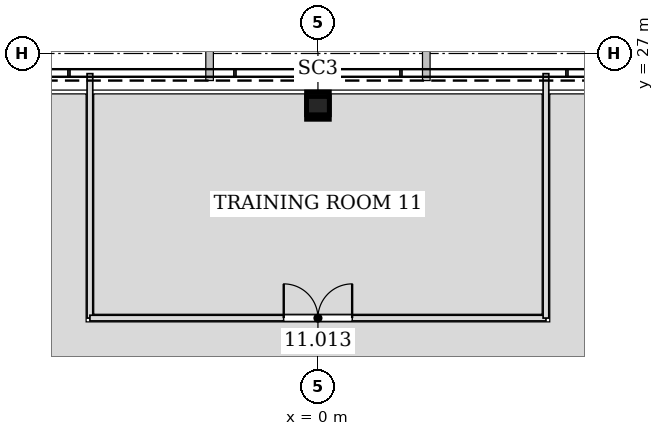
"""IFC4 building model, lengths in metres.
Left out: names, types, materials, properties, quantities, classifications, styles, units other than length and angle.
Written with IfcOpenShell. Run it as: python <this file> out.ifc"""

import sys

from ifc_helpers import new_model, si_unit, direction, frame, frame_2d, origin, origin_2d, place, context, subcontext, project, spatial, rectangle, hollow_rectangle, extrude, element, fill, save


model = new_model("IFC4")
c1 = context("Model", 3, precision=1e-05, world=origin(), true_north=direction((0.0, 1.0)))
c2 = subcontext(c1, "Body", "Model", "MODEL_VIEW")
j1 = project(units=[si_unit("LENGTHUNIT", "METRE"), si_unit("PLANEANGLEUNIT", "RADIAN")], contexts=[c1])
p1 = place(None, origin())
s1 = spatial("IfcSite", under=j1, at=p1, CompositionType="ELEMENT")
p2 = place(p1, origin())
s2 = spatial("IfcBuilding", under=s1, at=p2, CompositionType="ELEMENT")
p3 = place(p2, frame((0.0, 0.0, 54.0)))
s3 = spatial("IfcBuildingStorey", under=s2, at=p3, CompositionType="ELEMENT", Elevation=54.0)
p4 = place(p3, frame((0.0, 25.687, 0.0), z_axis=(0.0, -0.028239619523, 0.999601182417), x_axis=(1.0, 0.0, 0.0)))
e1 = element("IfcColumn", 1, at=p4, inside=s3, PredefinedType="COLUMN", context=c2, shape_type="SweptSolid", body=[
    extrude(hollow_rectangle(XDim=0.6, YDim=0.6, WallThickness=0.032, at=origin_2d()), origin(), (0.0, 0.0, 1.0), 4.202),
])
p5 = place(p3, frame((-6.0, 26.469, 0.0), z_axis=(0.0, 0.0, 1.0), x_axis=(0.0, -1.0, 0.0)))
e2 = element("IfcWall", 2, at=p5, inside=s3, PredefinedType="PARTITIONING", context=c2, shape_type="SweptSolid", body=[
    extrude(rectangle(XDim=6.432, YDim=0.15, at=frame_2d((3.216, 0.0))), origin(), (0.0, 0.0, 1.0), 3.418),
])
p6 = place(p3, frame((-6.0, 20.037, 0.0), z_axis=(0.0, 0.0, 1.0), x_axis=(1.0, 0.0, 0.0)))
e3 = element("IfcWall", 3, at=p6, inside=s3, PredefinedType="PARTITIONING", context=c2, shape_type="SweptSolid", body=[
    extrude(rectangle(XDim=12.0, YDim=0.15, at=frame_2d((6.0, 0.0))), origin(), (0.0, 0.0, 1.0), 2.984),
])
p7 = place(p6, frame((5.1, 0.0, 0.0)))
e4 = element("IfcOpeningElement", 4, at=p7, cuts=e3, PredefinedType="OPENING", context=c2, shape_type="SweptSolid", body=[
    extrude(rectangle(XDim=1.8, YDim=2.4, at=frame_2d((0.9, 1.2))), frame((0.0, 0.085, 0.0), z_axis=(0.0, -1.0, 0.0), x_axis=(1.0, 0.0, 0.0)), (0.0, 0.0, 1.0), 0.17),
])
p8 = place(p3, frame((6.0, 20.037, 0.0), z_axis=(0.0, 0.0, 1.0), x_axis=(0.0, 1.0, 0.0)))
e5 = element("IfcWall", 5, at=p8, inside=s3, PredefinedType="PARTITIONING", context=c2, shape_type="SweptSolid", body=[
    extrude(rectangle(XDim=6.432, YDim=0.15, at=frame_2d((3.216, 0.0))), origin(), (0.0, 0.0, 1.0), 3.418),
])
p9 = place(p7, origin())
e6 = element("IfcDoor", 6, at=p9, inside=s3, OperationType="DOUBLE_DOOR_SINGLE_SWING", PredefinedType="DOOR", context=c2, shape_type="SweptSolid", body=[
    extrude(rectangle(XDim=1.8, YDim=2.4, at=frame_2d((0.9, 1.2))), frame((0.0, 0.025, 0.0), z_axis=(0.0, -1.0, 0.0), x_axis=(1.0, 0.0, 0.0)), (0.0, 0.0, 1.0), 0.05),
])
fill(e4, e6)
save(model, sys.argv[1])
